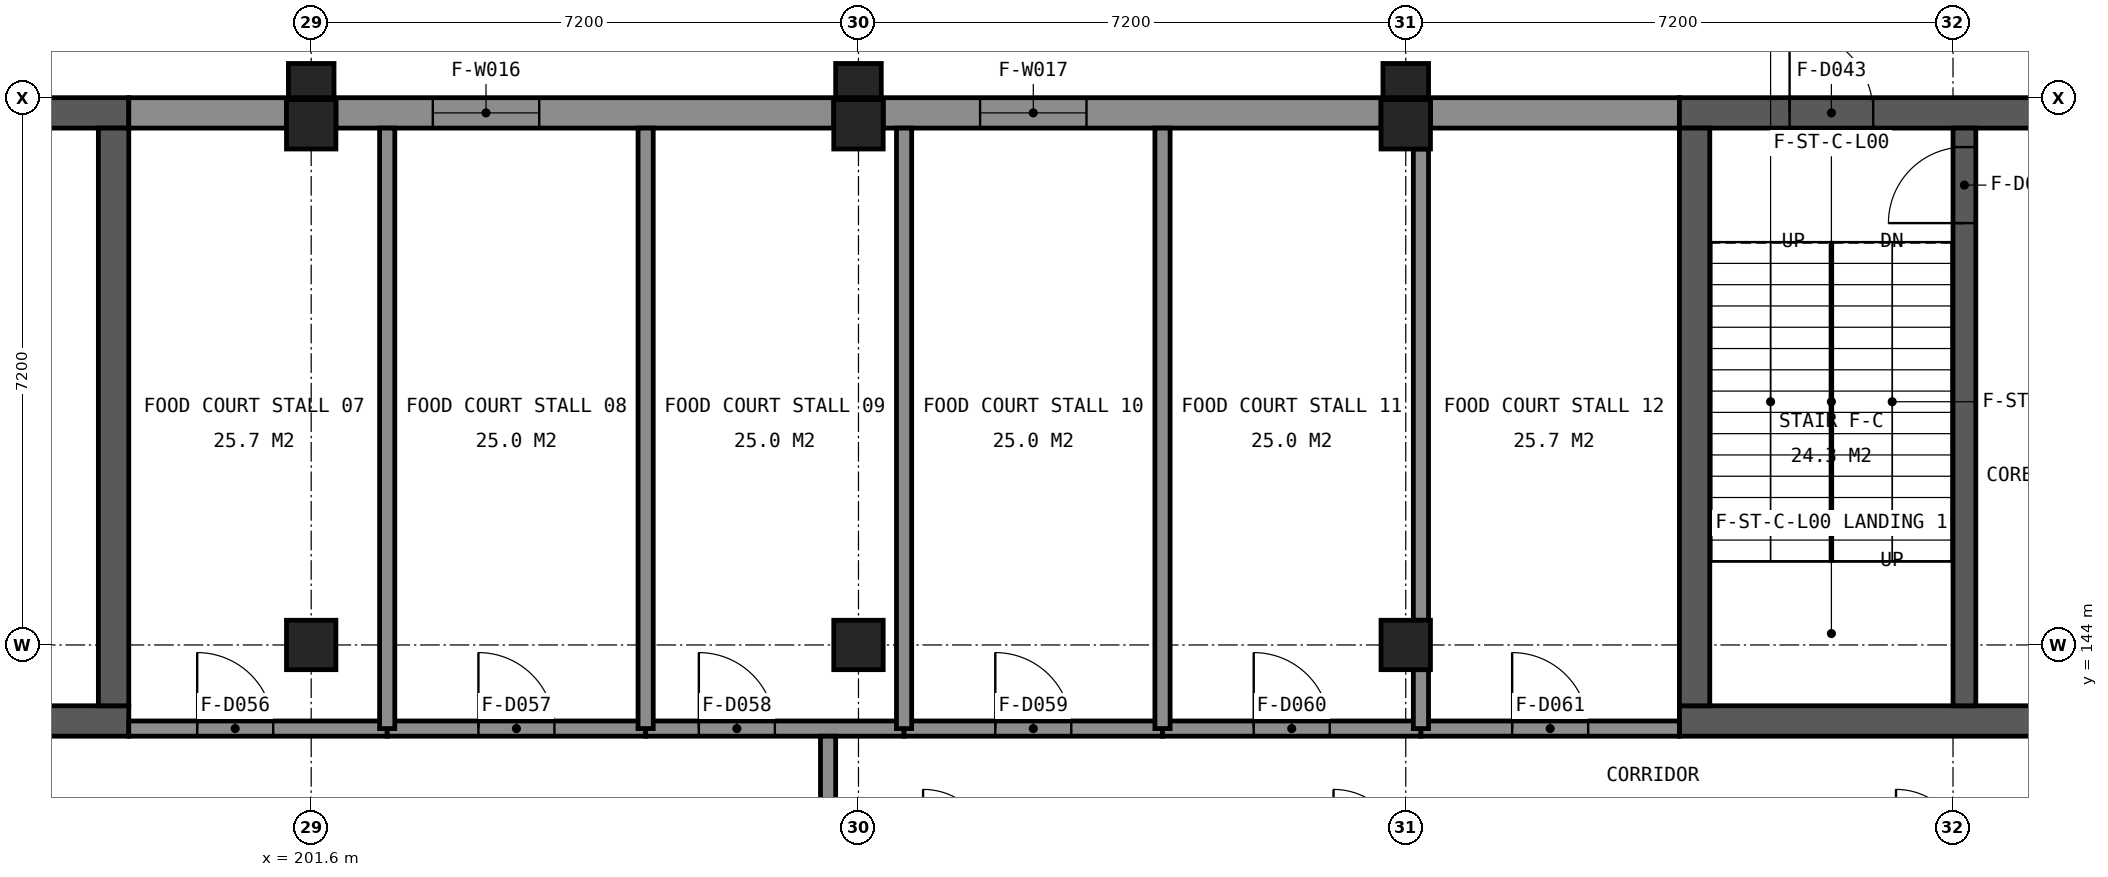
"""IFC4 building model, lengths in metres.
Left out: names, types, materials, properties, quantities, classifications, styles, units other than length and angle.
Written with IfcOpenShell. Run it as: python <this file> out.ifc"""

import sys

from ifc_helpers import new_model, si_unit, direction, frame, frame_2d, origin, origin_2d, place, context, subcontext, project, spatial, rectangle, extrude, element, fill, save


model = new_model("IFC4")
c1 = context("Model", 3, precision=1e-05, world=origin(), true_north=direction((0.0, 1.0)))
c2 = subcontext(c1, "Body", "Model", "MODEL_VIEW")
j1 = project(units=[si_unit("LENGTHUNIT", "METRE"), si_unit("PLANEANGLEUNIT", "RADIAN")], contexts=[c1])
p1 = place(None, origin())
s1 = spatial("IfcSite", under=j1, at=p1, CompositionType="ELEMENT")
p2 = place(p1, origin())
s2 = spatial("IfcBuilding", under=s1, at=p2, CompositionType="ELEMENT")
p3 = place(p2, frame((0.0, 0.0, 4.8)))
s3 = spatial("IfcBuildingStorey", under=s2, at=p3, CompositionType="ELEMENT", Elevation=4.8)
for number, where, z_axis, x_axis in (
    (1, (201.6, 144.0, 0.0), (0.0, 0.0, 1.0), (1.0, 0.0, 0.0)),
    (2, (208.8, 144.0, 0.0), (0.0, 0.0, 1.0), (1.0, 0.0, 0.0)),
    (3, (216.0, 144.0, 0.0), (0.0, 0.0, 1.0), (1.0, 0.0, 0.0)),
    (4, (201.6, 150.85, 0.0), (0.0, 0.0, 1.0), (1.0, 0.0, 0.0)),
    (5, (208.8, 150.85, 0.0), (0.0, 0.0, 1.0), (1.0, 0.0, 0.0)),
    (6, (216.0, 150.85, 0.0), (0.0, 0.0, 1.0), (1.0, 0.0, 0.0)),
):
    element("IfcColumn", number, at=place(p3, frame(where, z_axis=z_axis, x_axis=x_axis)), inside=s3, PredefinedType="COLUMN", context=c2, shape_type="SweptSolid", body=[
        extrude(rectangle(XDim=0.65, YDim=0.65, at=origin_2d()), origin(), (0.0, 0.0, 1.0), 4.8),
    ])
p4 = place(p3, frame((188.4, 151.0, 0.0), z_axis=(0.0, 0.0, 1.0), x_axis=(1.0, 0.0, 0.0)))
e7 = element("IfcWall", 7, at=p4, inside=s3, PredefinedType="SHEAR", context=c2, shape_type="SweptSolid", body=[
    extrude(rectangle(XDim=10.8, YDim=0.4, at=frame_2d((5.4, 0.0))), origin(), (0.0, 0.0, 1.0), 4.55),
])
p5 = place(p4, frame((1.45, 0.0, 0.0)))
e8 = element("IfcOpeningElement", 8, at=p5, cuts=e7, PredefinedType="OPENING", context=c2, shape_type="SweptSolid", body=[
    extrude(rectangle(XDim=1.1, YDim=2.1, at=frame_2d((0.55, 1.05))), frame((0.0, 0.21, 0.0), z_axis=(0.0, -1.0, 0.0), x_axis=(1.0, 0.0, 0.0)), (0.0, 0.0, 1.0), 0.42),
])
p6 = place(p3, frame((199.2, 151.0, 0.0), z_axis=(0.0, 0.0, 1.0), x_axis=(1.0, 0.0, 0.0)))
e9 = element("IfcWall", 9, at=p6, inside=s3, PredefinedType="SOLIDWALL", context=c2, shape_type="SweptSolid", body=[
    extrude(rectangle(XDim=2.075, YDim=0.4, at=frame_2d((1.038, 0.0))), origin(), (0.0, 0.0, 1.0), 3.95),
])
p7 = place(p3, frame((201.925, 151.0, 0.0), z_axis=(0.0, 0.0, 1.0), x_axis=(1.0, 0.0, 0.0)))
e10 = element("IfcWall", 10, at=p7, inside=s3, PredefinedType="SOLIDWALL", context=c2, shape_type="SweptSolid", body=[
    extrude(rectangle(XDim=6.55, YDim=0.4, at=frame_2d((3.275, 0.0))), origin(), (0.0, 0.0, 1.0), 3.95),
])
p8 = place(p7, frame((1.275, 0.0, 1.0)))
e11 = element("IfcOpeningElement", 11, at=p8, cuts=e10, PredefinedType="OPENING", context=c2, shape_type="SweptSolid", body=[
    extrude(rectangle(XDim=1.4, YDim=1.8, at=frame_2d((0.7, 0.9))), frame((0.0, 0.21, 0.0), z_axis=(0.0, -1.0, 0.0), x_axis=(1.0, 0.0, 0.0)), (0.0, 0.0, 1.0), 0.42),
])
p9 = place(p3, frame((209.125, 151.0, 0.0), z_axis=(0.0, 0.0, 1.0), x_axis=(1.0, 0.0, 0.0)))
e12 = element("IfcWall", 12, at=p9, inside=s3, PredefinedType="SOLIDWALL", context=c2, shape_type="SweptSolid", body=[
    extrude(rectangle(XDim=6.55, YDim=0.4, at=frame_2d((3.275, 0.0))), origin(), (0.0, 0.0, 1.0), 3.95),
])
p10 = place(p9, frame((1.275, 0.0, 1.0)))
e13 = element("IfcOpeningElement", 13, at=p10, cuts=e12, PredefinedType="OPENING", context=c2, shape_type="SweptSolid", body=[
    extrude(rectangle(XDim=1.4, YDim=1.8, at=frame_2d((0.7, 0.9))), frame((0.0, 0.21, 0.0), z_axis=(0.0, -1.0, 0.0), x_axis=(1.0, 0.0, 0.0)), (0.0, 0.0, 1.0), 0.42),
])
p11 = place(p3, frame((216.325, 151.0, 0.0), z_axis=(0.0, 0.0, 1.0), x_axis=(1.0, 0.0, 0.0)))
e14 = element("IfcWall", 14, at=p11, inside=s3, PredefinedType="SOLIDWALL", context=c2, shape_type="SweptSolid", body=[
    extrude(rectangle(XDim=3.275, YDim=0.4, at=frame_2d((1.638, 0.0))), origin(), (0.0, 0.0, 1.0), 3.95),
])
p12 = place(p3, frame((219.6, 151.0, 0.0), z_axis=(0.0, 0.0, 1.0), x_axis=(1.0, 0.0, 0.0)))
e15 = element("IfcWall", 15, at=p12, inside=s3, PredefinedType="SHEAR", context=c2, shape_type="SweptSolid", body=[
    extrude(rectangle(XDim=10.8, YDim=0.4, at=frame_2d((5.4, 0.0))), origin(), (0.0, 0.0, 1.0), 4.55),
])
p13 = place(p12, frame((1.45, 0.0, 0.0)))
e16 = element("IfcOpeningElement", 16, at=p13, cuts=e15, PredefinedType="OPENING", context=c2, shape_type="SweptSolid", body=[
    extrude(rectangle(XDim=1.1, YDim=2.1, at=frame_2d((0.55, 1.05))), frame((0.0, 0.21, 0.0), z_axis=(0.0, -1.0, 0.0), x_axis=(1.0, 0.0, 0.0)), (0.0, 0.0, 1.0), 0.42),
])
p14 = place(p3, frame((188.4, 143.0, 0.0), z_axis=(0.0, 0.0, 1.0), x_axis=(1.0, 0.0, 0.0)))
e17 = element("IfcWall", 17, at=p14, inside=s3, PredefinedType="SHEAR", context=c2, shape_type="SweptSolid", body=[
    extrude(rectangle(XDim=10.8, YDim=0.4, at=frame_2d((5.4, 0.0))), origin(), (0.0, 0.0, 1.0), 4.55),
])
p15 = place(p14, frame((6.0, 0.0, 0.0)))
e18 = element("IfcOpeningElement", 18, at=p15, cuts=e17, PredefinedType="OPENING", context=c2, shape_type="SweptSolid", body=[
    extrude(rectangle(XDim=1.8, YDim=2.1, at=frame_2d((0.9, 1.05))), frame((0.0, 0.21, 0.0), z_axis=(0.0, -1.0, 0.0), x_axis=(1.0, 0.0, 0.0)), (0.0, 0.0, 1.0), 0.42),
])
p16 = place(p3, frame((199.0, 143.2, 0.0), z_axis=(0.0, 0.0, 1.0), x_axis=(0.0, 1.0, 0.0)))
e19 = element("IfcWall", 19, at=p16, inside=s3, PredefinedType="SHEAR", context=c2, shape_type="SweptSolid", body=[
    extrude(rectangle(XDim=7.6, YDim=0.4, at=frame_2d((3.8, 0.0))), origin(), (0.0, 0.0, 1.0), 4.55),
])
p17 = place(p3, frame((219.6, 143.0, 0.0), z_axis=(0.0, 0.0, 1.0), x_axis=(1.0, 0.0, 0.0)))
e20 = element("IfcWall", 20, at=p17, inside=s3, PredefinedType="SHEAR", context=c2, shape_type="SweptSolid", body=[
    extrude(rectangle(XDim=10.8, YDim=0.4, at=frame_2d((5.4, 0.0))), origin(), (0.0, 0.0, 1.0), 4.55),
])
p18 = place(p17, frame((6.0, 0.0, 0.0)))
e21 = element("IfcOpeningElement", 21, at=p18, cuts=e20, PredefinedType="OPENING", context=c2, shape_type="SweptSolid", body=[
    extrude(rectangle(XDim=1.8, YDim=2.1, at=frame_2d((0.9, 1.05))), frame((0.0, 0.21, 0.0), z_axis=(0.0, -1.0, 0.0), x_axis=(1.0, 0.0, 0.0)), (0.0, 0.0, 1.0), 0.42),
])
p19 = place(p3, frame((219.8, 143.2, 0.0), z_axis=(0.0, 0.0, 1.0), x_axis=(0.0, 1.0, 0.0)))
e22 = element("IfcWall", 22, at=p19, inside=s3, PredefinedType="SHEAR", context=c2, shape_type="SweptSolid", body=[
    extrude(rectangle(XDim=7.6, YDim=0.4, at=frame_2d((3.8, 0.0))), origin(), (0.0, 0.0, 1.0), 4.55),
])
p20 = place(p3, frame((223.35, 143.2, 0.0), z_axis=(0.0, 0.0, 1.0), x_axis=(0.0, 1.0, 0.0)))
e23 = element("IfcWall", 23, at=p20, inside=s3, PredefinedType="SHEAR", context=c2, shape_type="SweptSolid", body=[
    extrude(rectangle(XDim=7.6, YDim=0.3, at=frame_2d((3.8, 0.0))), origin(), (0.0, 0.0, 1.0), 4.55),
])
p21 = place(p20, frame((6.35, 0.0, 0.0)))
e24 = element("IfcOpeningElement", 24, at=p21, cuts=e23, PredefinedType="OPENING", context=c2, shape_type="SweptSolid", body=[
    extrude(rectangle(XDim=1.0, YDim=2.1, at=frame_2d((0.5, 1.05))), frame((0.0, 0.16, 0.0), z_axis=(0.0, -1.0, 0.0), x_axis=(1.0, 0.0, 0.0)), (0.0, 0.0, 1.0), 0.32),
])
for number, where, z_axis, x_axis in (
    (25, (201.6, 151.425, 0.0), (0.0, 0.0, 1.0), (1.0, 0.0, 0.0)),
    (26, (208.8, 151.425, 0.0), (0.0, 0.0, 1.0), (1.0, 0.0, 0.0)),
    (27, (216.0, 151.425, 0.0), (0.0, 0.0, 1.0), (1.0, 0.0, 0.0)),
):
    element("IfcColumn", number, at=place(p3, frame(where, z_axis=z_axis, x_axis=x_axis)), inside=s3, PredefinedType="PILASTER", context=c2, shape_type="SweptSolid", body=[
        extrude(rectangle(XDim=0.6, YDim=0.45, at=origin_2d()), origin(), (0.0, 0.0, 1.0), 4.8),
    ])
p22 = place(p3, frame((199.2, 142.9, 0.0), z_axis=(0.0, 0.0, 1.0), x_axis=(1.0, 0.0, 0.0)))
e28 = element("IfcWall", 28, at=p22, inside=s3, PredefinedType="PARTITIONING", context=c2, shape_type="SweptSolid", body=[
    extrude(rectangle(XDim=3.4, YDim=0.2, at=frame_2d((1.7, 0.0))), origin(), (0.0, 0.0, 1.0), 3.95),
])
p23 = place(p22, frame((0.9, 0.0, 0.0)))
e29 = element("IfcOpeningElement", 29, at=p23, cuts=e28, PredefinedType="OPENING", context=c2, shape_type="SweptSolid", body=[
    extrude(rectangle(XDim=1.0, YDim=2.1, at=frame_2d((0.5, 1.05))), frame((0.0, 0.11, 0.0), z_axis=(0.0, -1.0, 0.0), x_axis=(1.0, 0.0, 0.0)), (0.0, 0.0, 1.0), 0.22),
])
p24 = place(p3, frame((202.6, 142.9, 0.0), z_axis=(0.0, 0.0, 1.0), x_axis=(1.0, 0.0, 0.0)))
e30 = element("IfcWall", 30, at=p24, inside=s3, PredefinedType="PARTITIONING", context=c2, shape_type="SweptSolid", body=[
    extrude(rectangle(XDim=3.4, YDim=0.2, at=frame_2d((1.7, 0.0))), origin(), (0.0, 0.0, 1.0), 3.95),
])
p25 = place(p24, frame((1.2, 0.0, 0.0)))
e31 = element("IfcOpeningElement", 31, at=p25, cuts=e30, PredefinedType="OPENING", context=c2, shape_type="SweptSolid", body=[
    extrude(rectangle(XDim=1.0, YDim=2.1, at=frame_2d((0.5, 1.05))), frame((0.0, 0.11, 0.0), z_axis=(0.0, -1.0, 0.0), x_axis=(1.0, 0.0, 0.0)), (0.0, 0.0, 1.0), 0.22),
])
p26 = place(p3, frame((206.0, 142.9, 0.0), z_axis=(0.0, 0.0, 1.0), x_axis=(1.0, 0.0, 0.0)))
e32 = element("IfcWall", 32, at=p26, inside=s3, PredefinedType="PARTITIONING", context=c2, shape_type="SweptSolid", body=[
    extrude(rectangle(XDim=3.4, YDim=0.2, at=frame_2d((1.7, 0.0))), origin(), (0.0, 0.0, 1.0), 3.95),
])
p27 = place(p26, frame((0.7, 0.0, 0.0)))
e33 = element("IfcOpeningElement", 33, at=p27, cuts=e32, PredefinedType="OPENING", context=c2, shape_type="SweptSolid", body=[
    extrude(rectangle(XDim=1.0, YDim=2.1, at=frame_2d((0.5, 1.05))), frame((0.0, 0.11, 0.0), z_axis=(0.0, -1.0, 0.0), x_axis=(1.0, 0.0, 0.0)), (0.0, 0.0, 1.0), 0.22),
])
p28 = place(p3, frame((209.4, 142.9, 0.0), z_axis=(0.0, 0.0, 1.0), x_axis=(1.0, 0.0, 0.0)))
e34 = element("IfcWall", 34, at=p28, inside=s3, PredefinedType="PARTITIONING", context=c2, shape_type="SweptSolid", body=[
    extrude(rectangle(XDim=3.4, YDim=0.2, at=frame_2d((1.7, 0.0))), origin(), (0.0, 0.0, 1.0), 3.95),
])
p29 = place(p28, frame((1.2, 0.0, 0.0)))
e35 = element("IfcOpeningElement", 35, at=p29, cuts=e34, PredefinedType="OPENING", context=c2, shape_type="SweptSolid", body=[
    extrude(rectangle(XDim=1.0, YDim=2.1, at=frame_2d((0.5, 1.05))), frame((0.0, 0.11, 0.0), z_axis=(0.0, -1.0, 0.0), x_axis=(1.0, 0.0, 0.0)), (0.0, 0.0, 1.0), 0.22),
])
p30 = place(p3, frame((212.8, 142.9, 0.0), z_axis=(0.0, 0.0, 1.0), x_axis=(1.0, 0.0, 0.0)))
e36 = element("IfcWall", 36, at=p30, inside=s3, PredefinedType="PARTITIONING", context=c2, shape_type="SweptSolid", body=[
    extrude(rectangle(XDim=3.4, YDim=0.2, at=frame_2d((1.7, 0.0))), origin(), (0.0, 0.0, 1.0), 3.95),
])
p31 = place(p30, frame((1.2, 0.0, 0.0)))
e37 = element("IfcOpeningElement", 37, at=p31, cuts=e36, PredefinedType="OPENING", context=c2, shape_type="SweptSolid", body=[
    extrude(rectangle(XDim=1.0, YDim=2.1, at=frame_2d((0.5, 1.05))), frame((0.0, 0.11, 0.0), z_axis=(0.0, -1.0, 0.0), x_axis=(1.0, 0.0, 0.0)), (0.0, 0.0, 1.0), 0.22),
])
p32 = place(p3, frame((216.2, 142.9, 0.0), z_axis=(0.0, 0.0, 1.0), x_axis=(1.0, 0.0, 0.0)))
e38 = element("IfcWall", 38, at=p32, inside=s3, PredefinedType="PARTITIONING", context=c2, shape_type="SweptSolid", body=[
    extrude(rectangle(XDim=3.4, YDim=0.2, at=frame_2d((1.7, 0.0))), origin(), (0.0, 0.0, 1.0), 3.95),
])
p33 = place(p32, frame((1.2, 0.0, 0.0)))
e39 = element("IfcOpeningElement", 39, at=p33, cuts=e38, PredefinedType="OPENING", context=c2, shape_type="SweptSolid", body=[
    extrude(rectangle(XDim=1.0, YDim=2.1, at=frame_2d((0.5, 1.05))), frame((0.0, 0.11, 0.0), z_axis=(0.0, -1.0, 0.0), x_axis=(1.0, 0.0, 0.0)), (0.0, 0.0, 1.0), 0.22),
])
for number, where, z_axis, x_axis in (
    (40, (202.6, 142.9, 0.0), (0.0, 0.0, 1.0), (0.0, 1.0, 0.0)),
    (41, (206.0, 142.9, 0.0), (0.0, 0.0, 1.0), (0.0, 1.0, 0.0)),
):
    element("IfcWall", number, at=place(p3, frame(where, z_axis=z_axis, x_axis=x_axis)), inside=s3, PredefinedType="PARTITIONING", context=c2, shape_type="SweptSolid", body=[
        extrude(rectangle(XDim=7.9, YDim=0.2, at=frame_2d((3.95, 0.0))), origin(), (0.0, 0.0, 1.0), 3.95),
    ])
p34 = place(p3, frame((208.4, 141.2, 0.0), z_axis=(0.0, 0.0, 1.0), x_axis=(0.0, 1.0, 0.0)))
e42 = element("IfcWall", 42, at=p34, inside=s3, PredefinedType="PARTITIONING", context=c2, shape_type="SweptSolid", body=[
    extrude(rectangle(XDim=1.6, YDim=0.2, at=frame_2d((0.8, 0.0))), origin(), (0.0, 0.0, 1.0), 3.95),
])
for number, where, z_axis, x_axis in (
    (43, (209.4, 142.9, 0.0), (0.0, 0.0, 1.0), (0.0, 1.0, 0.0)),
    (44, (212.8, 142.9, 0.0), (0.0, 0.0, 1.0), (0.0, 1.0, 0.0)),
):
    element("IfcWall", number, at=place(p3, frame(where, z_axis=z_axis, x_axis=x_axis)), inside=s3, PredefinedType="PARTITIONING", context=c2, shape_type="SweptSolid", body=[
        extrude(rectangle(XDim=7.9, YDim=0.2, at=frame_2d((3.95, 0.0))), origin(), (0.0, 0.0, 1.0), 3.95),
    ])
p35 = place(p3, frame((216.2, 142.9, 0.0), z_axis=(0.0, 0.0, 1.0), x_axis=(0.0, 1.0, 0.0)))
e45 = element("IfcWall", 45, at=p35, inside=s3, PredefinedType="PARTITIONING", context=c2, shape_type="SweptSolid", body=[
    extrude(rectangle(XDim=0.775, YDim=0.2, at=frame_2d((0.388, 0.0))), origin(), (0.0, 0.0, 1.0), 3.95),
])
p36 = place(p3, frame((216.2, 144.325, 0.0), z_axis=(0.0, 0.0, 1.0), x_axis=(0.0, 1.0, 0.0)))
e46 = element("IfcWall", 46, at=p36, inside=s3, PredefinedType="PARTITIONING", context=c2, shape_type="SweptSolid", body=[
    extrude(rectangle(XDim=6.2, YDim=0.2, at=frame_2d((3.1, 0.0))), origin(), (0.0, 0.0, 1.0), 3.95),
])
p37 = place(p8, origin())
e47 = element("IfcWindow", 47, at=p37, inside=s3, PartitioningType="SINGLE_PANEL", PredefinedType="WINDOW", context=c2, shape_type="SweptSolid", body=[
    extrude(rectangle(XDim=1.4, YDim=1.8, at=frame_2d((0.7, 0.9))), frame((0.0, -0.09, 0.0), z_axis=(0.0, -1.0, 0.0), x_axis=(1.0, 0.0, 0.0)), (0.0, 0.0, 1.0), 0.06),
])
fill(e11, e47)
p38 = place(p10, origin())
e48 = element("IfcWindow", 48, at=p38, inside=s3, PartitioningType="SINGLE_PANEL", PredefinedType="WINDOW", context=c2, shape_type="SweptSolid", body=[
    extrude(rectangle(XDim=1.4, YDim=1.8, at=frame_2d((0.7, 0.9))), frame((0.0, -0.09, 0.0), z_axis=(0.0, -1.0, 0.0), x_axis=(1.0, 0.0, 0.0)), (0.0, 0.0, 1.0), 0.06),
])
fill(e13, e48)
p39 = place(p21, origin())
e49 = element("IfcDoor", 49, at=p39, inside=s3, OperationType="NOTDEFINED", PredefinedType="DOOR", context=c2, shape_type="SweptSolid", body=[
    extrude(rectangle(XDim=1.0, YDim=2.1, at=frame_2d((0.5, 1.05))), frame((0.0, 0.025, 0.0), z_axis=(0.0, -1.0, 0.0), x_axis=(1.0, 0.0, 0.0)), (0.0, 0.0, 1.0), 0.05),
])
fill(e24, e49)
p40 = place(p13, origin())
e50 = element("IfcDoor", 50, at=p40, inside=s3, OperationType="NOTDEFINED", PredefinedType="DOOR", context=c2, shape_type="SweptSolid", body=[
    extrude(rectangle(XDim=1.1, YDim=2.1, at=frame_2d((0.55, 1.05))), frame((0.0, 0.025, 0.0), z_axis=(0.0, -1.0, 0.0), x_axis=(1.0, 0.0, 0.0)), (0.0, 0.0, 1.0), 0.05),
])
fill(e16, e50)
p41 = place(p23, origin())
e51 = element("IfcDoor", 51, at=p41, inside=s3, OperationType="NOTDEFINED", PredefinedType="DOOR", context=c2, shape_type="SweptSolid", body=[
    extrude(rectangle(XDim=1.0, YDim=2.1, at=frame_2d((0.5, 1.05))), frame((0.0, 0.025, 0.0), z_axis=(0.0, -1.0, 0.0), x_axis=(1.0, 0.0, 0.0)), (0.0, 0.0, 1.0), 0.05),
])
fill(e29, e51)
p42 = place(p25, origin())
e52 = element("IfcDoor", 52, at=p42, inside=s3, OperationType="NOTDEFINED", PredefinedType="DOOR", context=c2, shape_type="SweptSolid", body=[
    extrude(rectangle(XDim=1.0, YDim=2.1, at=frame_2d((0.5, 1.05))), frame((0.0, 0.025, 0.0), z_axis=(0.0, -1.0, 0.0), x_axis=(1.0, 0.0, 0.0)), (0.0, 0.0, 1.0), 0.05),
])
fill(e31, e52)
p43 = place(p27, origin())
e53 = element("IfcDoor", 53, at=p43, inside=s3, OperationType="NOTDEFINED", PredefinedType="DOOR", context=c2, shape_type="SweptSolid", body=[
    extrude(rectangle(XDim=1.0, YDim=2.1, at=frame_2d((0.5, 1.05))), frame((0.0, 0.025, 0.0), z_axis=(0.0, -1.0, 0.0), x_axis=(1.0, 0.0, 0.0)), (0.0, 0.0, 1.0), 0.05),
])
fill(e33, e53)
p44 = place(p29, origin())
e54 = element("IfcDoor", 54, at=p44, inside=s3, OperationType="NOTDEFINED", PredefinedType="DOOR", context=c2, shape_type="SweptSolid", body=[
    extrude(rectangle(XDim=1.0, YDim=2.1, at=frame_2d((0.5, 1.05))), frame((0.0, 0.025, 0.0), z_axis=(0.0, -1.0, 0.0), x_axis=(1.0, 0.0, 0.0)), (0.0, 0.0, 1.0), 0.05),
])
fill(e35, e54)
p45 = place(p31, origin())
e55 = element("IfcDoor", 55, at=p45, inside=s3, OperationType="NOTDEFINED", PredefinedType="DOOR", context=c2, shape_type="SweptSolid", body=[
    extrude(rectangle(XDim=1.0, YDim=2.1, at=frame_2d((0.5, 1.05))), frame((0.0, 0.025, 0.0), z_axis=(0.0, -1.0, 0.0), x_axis=(1.0, 0.0, 0.0)), (0.0, 0.0, 1.0), 0.05),
])
fill(e37, e55)
p46 = place(p33, origin())
e56 = element("IfcDoor", 56, at=p46, inside=s3, OperationType="NOTDEFINED", PredefinedType="DOOR", context=c2, shape_type="SweptSolid", body=[
    extrude(rectangle(XDim=1.0, YDim=2.1, at=frame_2d((0.5, 1.05))), frame((0.0, 0.025, 0.0), z_axis=(0.0, -1.0, 0.0), x_axis=(1.0, 0.0, 0.0)), (0.0, 0.0, 1.0), 0.05),
])
fill(e39, e56)
save(model, sys.argv[1])
